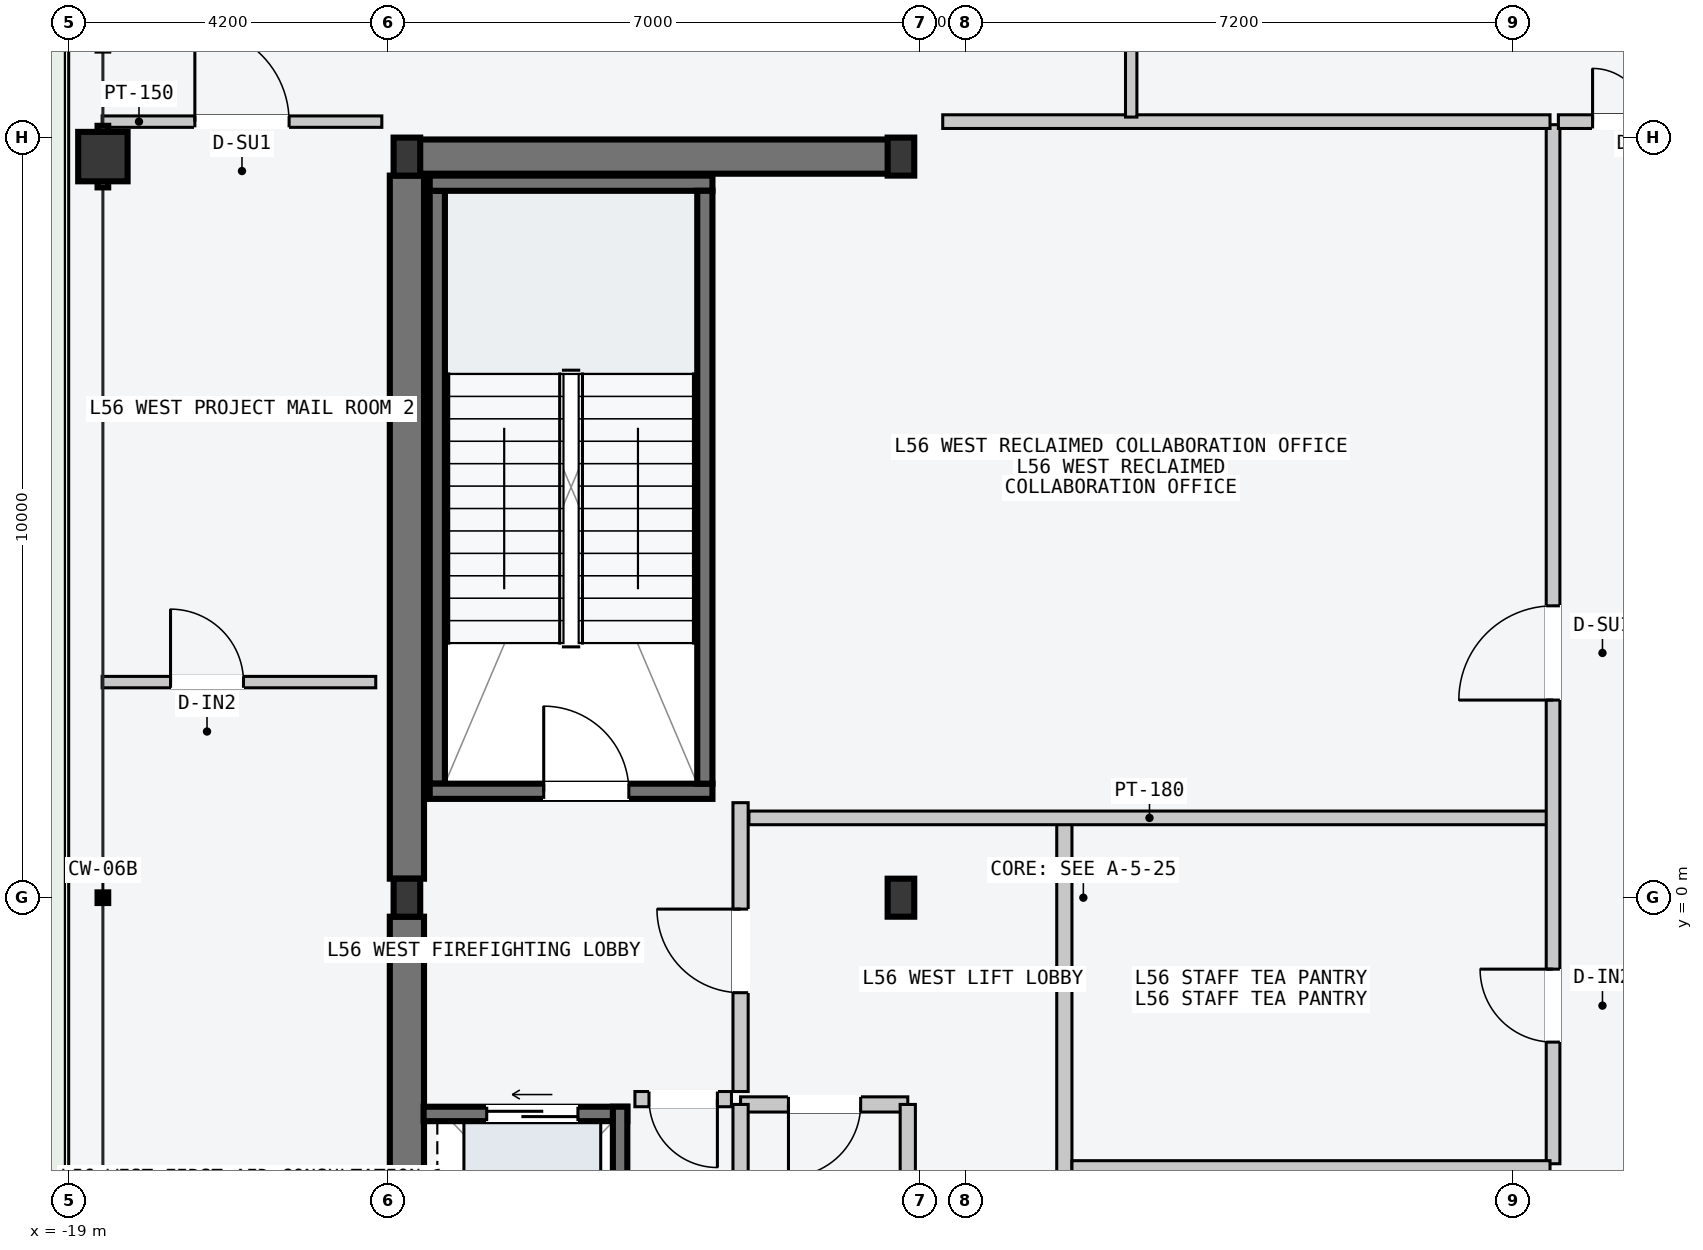
"""IFC4 building model, lengths in metres.
Left out: names, types, materials, properties, quantities, classifications, styles, units other than length and angle.
Written with IfcOpenShell. Run it as: python <this file> out.ifc"""

import sys

from ifc_helpers import new_model, si_unit, direction, frame, frame_2d, origin, origin_2d, place, context, subcontext, project, spatial, rectangle, hollow_rectangle, i_section, extrude, element, fill, save


model = new_model("IFC4")
c1 = context("Model", 3, precision=1e-05, world=origin(), true_north=direction((0.0, 1.0)))
c2 = subcontext(c1, "Body", "Model", "MODEL_VIEW")
j1 = project(units=[si_unit("LENGTHUNIT", "METRE"), si_unit("PLANEANGLEUNIT", "RADIAN")], contexts=[c1])
p1 = place(None, origin())
s1 = spatial("IfcSite", under=j1, at=p1, CompositionType="ELEMENT")
p2 = place(p1, origin())
s2 = spatial("IfcBuilding", under=s1, at=p2, CompositionType="ELEMENT")
p3 = place(p2, frame((0.0, 0.0, 213.9)))
s3 = spatial("IfcBuildingStorey", under=s2, at=p3, CompositionType="ELEMENT", Elevation=213.9)
p4 = place(p3, frame((-14.53, 9.75, -0.2), z_axis=(0.0, 0.0, 1.0), x_axis=(1.0, 0.0, 0.0)))
e1 = element("IfcWall", 1, at=p4, inside=s3, PredefinedType="SHEAR", context=c2, shape_type="SweptSolid", body=[
    extrude(rectangle(XDim=6.46, YDim=0.45, at=frame_2d((3.23, 0.0))), origin(), (0.0, 0.0, 1.0), 4.5),
])
for number, where, z_axis, x_axis in (
    (2, (-14.55, -9.5, -0.2), (0.0, 0.0, 1.0), (0.0, 1.0, 0.0)),
    (3, (-14.55, 0.25, -0.2), (0.0, 0.0, 1.0), (0.0, 1.0, 0.0)),
):
    element("IfcWall", number, at=place(p3, frame(where, z_axis=z_axis, x_axis=x_axis)), inside=s3, PredefinedType="SHEAR", context=c2, shape_type="SweptSolid", body=[
        extrude(rectangle(XDim=9.25, YDim=0.45, at=frame_2d((4.625, 0.0))), origin(), (0.0, 0.0, 1.0), 4.5),
    ])
p5 = place(p3, frame((-14.15, 1.5, -0.2), z_axis=(0.0, 0.0, 1.0), x_axis=(0.0, 1.0, 0.0)))
e4 = element("IfcWall", 4, at=p5, inside=s3, PredefinedType="SOLIDWALL", context=c2, shape_type="SweptSolid", body=[
    extrude(rectangle(XDim=7.8, YDim=0.2, at=frame_2d((3.9, 0.0))), origin(), (0.0, 0.0, 1.0), 4.5),
])
p6 = place(p3, frame((-14.25, 1.4, -0.2), z_axis=(0.0, 0.0, 1.0), x_axis=(1.0, 0.0, 0.0)))
e5 = element("IfcWall", 5, at=p6, inside=s3, PredefinedType="SOLIDWALL", context=c2, shape_type="SweptSolid", body=[
    extrude(rectangle(XDim=3.72, YDim=0.2, at=frame_2d((1.86, 0.0))), origin(), (0.0, 0.0, 1.0), 4.5),
])
p7 = place(p6, frame((1.5, 0.0, 0.2)))
e6 = element("IfcOpeningElement", 6, at=p7, cuts=e5, PredefinedType="OPENING", context=c2, shape_type="SweptSolid", body=[
    extrude(rectangle(XDim=1.12, YDim=2.18, at=frame_2d((0.56, 1.09))), frame((0.0, 0.11, 0.0), z_axis=(0.0, -1.0, 0.0), x_axis=(1.0, 0.0, 0.0)), (0.0, 0.0, 1.0), 0.22),
])
p8 = place(p3, frame((-14.25, 9.4, -0.2), z_axis=(0.0, 0.0, 1.0), x_axis=(1.0, 0.0, 0.0)))
e7 = element("IfcWall", 7, at=p8, inside=s3, PredefinedType="SOLIDWALL", context=c2, shape_type="SweptSolid", body=[
    extrude(rectangle(XDim=3.72, YDim=0.2, at=frame_2d((1.86, 0.0))), origin(), (0.0, 0.0, 1.0), 4.5),
])
p9 = place(p3, frame((-10.63, 1.5, -0.2), z_axis=(0.0, 0.0, 1.0), x_axis=(0.0, 1.0, 0.0)))
e8 = element("IfcWall", 8, at=p9, inside=s3, PredefinedType="SOLIDWALL", context=c2, shape_type="SweptSolid", body=[
    extrude(rectangle(XDim=7.8, YDim=0.2, at=frame_2d((3.9, 0.0))), origin(), (0.0, 0.0, 1.0), 4.5),
])
for number, where, z_axis, x_axis in (
    (9, (-14.55, 0.0, 0.0), (0.0, 0.0, 1.0), (1.0, 0.0, 0.0)),
    (10, (-14.55, 9.75, 0.0), (0.0, 0.0, 1.0), (1.0, 0.0, 0.0)),
    (11, (-8.05, 0.0, 0.0), (0.0, 0.0, 1.0), (1.0, 0.0, 0.0)),
    (12, (-8.05, 9.75, 0.0), (0.0, 0.0, 1.0), (1.0, 0.0, 0.0)),
):
    element("IfcColumn", number, at=place(p3, frame(where, z_axis=z_axis, x_axis=x_axis)), inside=s3, PredefinedType="COLUMN", context=c2, shape_type="SweptSolid", body=[
        extrude(i_section(OverallWidth=0.35, OverallDepth=0.5, WebThickness=0.02, FlangeThickness=0.032, at=origin_2d()), origin(), (0.0, 0.0, 1.0), 4.5),
    ])
p10 = place(p3, frame((-18.55, 9.75, -0.2), z_axis=(0.0, 0.0, 1.0), x_axis=(0.0, 1.0, 0.0)))
e13 = element("IfcColumn", 13, at=p10, inside=s3, PredefinedType="COLUMN", context=c2, shape_type="SweptSolid", body=[
    extrude(hollow_rectangle(XDim=0.65, YDim=0.65, WallThickness=0.028, at=origin_2d()), origin(), (0.0, 0.0, 1.0), 4.7),
])
p11 = place(p3, frame((-14.33, -2.845, -0.2), z_axis=(0.0, 0.0, 1.0), x_axis=(1.0, 0.0, 0.0)))
e14 = element("IfcWall", 14, at=p11, inside=s3, PredefinedType="SOLIDWALL", context=c2, shape_type="SweptSolid", body=[
    extrude(rectangle(XDim=2.68, YDim=0.19, at=frame_2d((1.34, 0.0))), origin(), (0.0, 0.0, 1.0), 4.5),
])
p12 = place(p11, frame((0.83, 0.0, 0.2)))
e15 = element("IfcOpeningElement", 15, at=p12, cuts=e14, PredefinedType="OPENING", context=c2, shape_type="SweptSolid", body=[
    extrude(rectangle(XDim=1.2, YDim=2.2, at=frame_2d((0.6, 1.1))), frame((0.0, 0.105, 0.0), z_axis=(0.0, -1.0, 0.0), x_axis=(1.0, 0.0, 0.0)), (0.0, 0.0, 1.0), 0.21),
])
p13 = place(p3, frame((-11.745, -5.35, -0.2), z_axis=(0.0, 0.0, 1.0), x_axis=(0.0, 1.0, 0.0)))
e16 = element("IfcWall", 16, at=p13, inside=s3, PredefinedType="SOLIDWALL", context=c2, shape_type="SweptSolid", body=[
    extrude(rectangle(XDim=2.6, YDim=0.19, at=frame_2d((1.3, 0.0))), origin(), (0.0, 0.0, 1.0), 4.5),
])
p14 = place(p3, frame((-5.9, -9.45, 0.0), z_axis=(0.0, 0.0, 1.0), x_axis=(0.0, 1.0, 0.0)))
e17 = element("IfcWall", 17, at=p14, inside=s3, PredefinedType="PARTITIONING", context=c2, shape_type="SweptSolid", body=[
    extrude(rectangle(XDim=10.5, YDim=0.2, at=frame_2d((5.25, 0.0))), origin(), (0.0, 0.0, 1.0), 4.3),
])
p15 = place(p14, frame((3.9, 0.0, 0.0)))
e18 = element("IfcOpeningElement", 18, at=p15, cuts=e17, PredefinedType="OPENING", context=c2, shape_type="SweptSolid", body=[
    extrude(rectangle(XDim=1.5, YDim=2.2, at=frame_2d((0.75, 1.1))), frame((0.0, 0.11, 0.0), z_axis=(0.0, -1.0, 0.0), x_axis=(1.0, 0.0, 0.0)), (0.0, 0.0, 1.0), 0.22),
])
p16 = place(p3, frame((-10.16, -2.55, 0.0), z_axis=(0.0, 0.0, 1.0), x_axis=(0.0, 1.0, 0.0)))
e19 = element("IfcWall", 19, at=p16, inside=s3, PredefinedType="PARTITIONING", context=c2, shape_type="SweptSolid", body=[
    extrude(rectangle(XDim=3.8, YDim=0.2, at=frame_2d((1.9, 0.0))), origin(), (0.0, 0.0, 1.0), 4.3),
])
p17 = place(p16, frame((1.3, 0.0, 0.0)))
e20 = element("IfcOpeningElement", 20, at=p17, cuts=e19, PredefinedType="OPENING", context=c2, shape_type="SweptSolid", body=[
    extrude(rectangle(XDim=1.1, YDim=2.15, at=frame_2d((0.55, 1.075))), frame((0.0, 0.11, 0.0), z_axis=(0.0, -1.0, 0.0), x_axis=(1.0, 0.0, 0.0)), (0.0, 0.0, 1.0), 0.22),
])
p18 = place(p3, frame((-10.28, -2.65, 0.0), z_axis=(0.0, 0.0, 1.0), x_axis=(-1.0, 0.0, 0.0)))
e21 = element("IfcWall", 21, at=p18, inside=s3, PredefinedType="PARTITIONING", context=c2, shape_type="SweptSolid", body=[
    extrude(rectangle(XDim=1.27, YDim=0.2, at=frame_2d((0.635, 0.0))), origin(), (0.0, 0.0, 1.0), 4.3),
])
p19 = place(p18, frame((0.185, 0.0, 0.0)))
e22 = element("IfcOpeningElement", 22, at=p19, cuts=e21, PredefinedType="OPENING", context=c2, shape_type="SweptSolid", body=[
    extrude(rectangle(XDim=0.9, YDim=2.15, at=frame_2d((0.45, 1.075))), frame((0.0, 0.11, 0.0), z_axis=(0.0, -1.0, 0.0), x_axis=(1.0, 0.0, 0.0)), (0.0, 0.0, 1.0), 0.22),
])
p20 = place(p3, frame((-7.96, -2.72, 0.0), z_axis=(0.0, 0.0, 1.0), x_axis=(-1.0, 0.0, 0.0)))
e23 = element("IfcWall", 23, at=p20, inside=s3, PredefinedType="PARTITIONING", context=c2, shape_type="SweptSolid", body=[
    extrude(rectangle(XDim=2.2, YDim=0.2, at=frame_2d((1.1, 0.0))), origin(), (0.0, 0.0, 1.0), 4.3),
])
p21 = place(p20, frame((0.62, 0.0, 0.0)))
e24 = element("IfcOpeningElement", 24, at=p21, cuts=e23, PredefinedType="OPENING", context=c2, shape_type="SweptSolid", body=[
    extrude(rectangle(XDim=0.95, YDim=2.1, at=frame_2d((0.475, 1.05))), frame((0.0, 0.11, 0.0), z_axis=(0.0, -1.0, 0.0), x_axis=(1.0, 0.0, 0.0)), (0.0, 0.0, 1.0), 0.22),
])
for number, where, z_axis, x_axis in (
    (25, (-7.96, -5.16, 0.0), (0.0, 0.0, 1.0), (0.0, 1.0, 0.0)),
    (26, (-10.16, -5.16, 0.0), (0.0, 0.0, 1.0), (0.0, 1.0, 0.0)),
):
    element("IfcWall", number, at=place(p3, frame(where, z_axis=z_axis, x_axis=x_axis)), inside=s3, PredefinedType="PARTITIONING", context=c2, shape_type="SweptSolid", body=[
        extrude(rectangle(XDim=2.44, YDim=0.2, at=frame_2d((1.22, 0.0))), origin(), (0.0, 0.0, 1.0), 4.3),
    ])
p22 = place(p3, frame((-10.05, 1.05, 0.0), z_axis=(0.0, 0.0, 1.0), x_axis=(1.0, 0.0, 0.0)))
e27 = element("IfcWall", 27, at=p22, inside=s3, PredefinedType="PARTITIONING", context=c2, shape_type="SweptSolid", body=[
    extrude(rectangle(XDim=10.54, YDim=0.18, at=frame_2d((5.27, 0.0))), origin(), (0.0, 0.0, 1.0), 4.3),
])
p23 = place(p3, frame((0.53, -3.5, 0.0), z_axis=(0.0, 0.0, 1.0), x_axis=(0.0, 1.0, 0.0)))
e28 = element("IfcWall", 28, at=p23, inside=s3, PredefinedType="PARTITIONING", context=c2, shape_type="SweptSolid", body=[
    extrude(rectangle(XDim=13.67, YDim=0.18, at=frame_2d((6.835, 0.0))), origin(), (0.0, 0.0, 1.0), 4.3),
])
p24 = place(p23, frame((6.1, 0.0, 0.0)))
e29 = element("IfcOpeningElement", 29, at=p24, cuts=e28, PredefinedType="OPENING", context=c2, shape_type="SweptSolid", body=[
    extrude(rectangle(XDim=1.24, YDim=2.24, at=frame_2d((0.62, 1.12))), frame((0.0, 0.1, 0.0), z_axis=(0.0, -1.0, 0.0), x_axis=(1.0, 0.0, 0.0)), (0.0, 0.0, 1.0), 0.2),
])
p25 = place(p23, frame((1.6, 0.0, 0.0)))
e30 = element("IfcOpeningElement", 30, at=p25, cuts=e28, PredefinedType="OPENING", context=c2, shape_type="SweptSolid", body=[
    extrude(rectangle(XDim=0.96, YDim=2.18, at=frame_2d((0.48, 1.09))), frame((0.0, 0.1, 0.0), z_axis=(0.0, -1.0, 0.0), x_axis=(1.0, 0.0, 0.0)), (0.0, 0.0, 1.0), 0.2),
])
p26 = place(p3, frame((-7.5, 10.21, 0.0), z_axis=(0.0, 0.0, 1.0), x_axis=(1.0, 0.0, 0.0)))
e31 = element("IfcWall", 31, at=p26, inside=s3, PredefinedType="PARTITIONING", context=c2, shape_type="SweptSolid", body=[
    extrude(rectangle(XDim=7.99, YDim=0.18, at=frame_2d((3.995, 0.0))), origin(), (0.0, 0.0, 1.0), 4.3),
])
p27 = place(p3, frame((-5.8, -3.55, 0.0), z_axis=(0.0, 0.0, 1.0), x_axis=(1.0, 0.0, 0.0)))
e32 = element("IfcWall", 32, at=p27, inside=s3, PredefinedType="PARTITIONING", context=c2, shape_type="SweptSolid", body=[
    extrude(rectangle(XDim=6.29, YDim=0.18, at=frame_2d((3.145, 0.0))), origin(), (0.0, 0.0, 1.0), 4.3),
])
p28 = place(p3, frame((-5.021, 10.27, 0.0), z_axis=(0.0, 0.0, 1.0), x_axis=(0.0, 1.0, 0.0)))
e33 = element("IfcWall", 33, at=p28, inside=s3, PredefinedType="PARTITIONING", context=c2, shape_type="SweptSolid", body=[
    extrude(rectangle(XDim=7.29, YDim=0.15, at=frame_2d((3.645, 0.0))), origin(), (0.0, 0.0, 1.0), 4.3),
])
p29 = place(p28, frame((1.15, 0.0, 0.0)))
e34 = element("IfcOpeningElement", 34, at=p29, cuts=e33, PredefinedType="OPENING", context=c2, shape_type="SweptSolid", body=[
    extrude(rectangle(XDim=0.96, YDim=2.18, at=frame_2d((0.48, 1.09))), frame((0.0, 0.085, 0.0), z_axis=(0.0, -1.0, 0.0), x_axis=(1.0, 0.0, 0.0)), (0.0, 0.0, 1.0), 0.17),
])
p30 = place(p3, frame((0.6, 10.21, 0.0), z_axis=(0.0, 0.0, 1.0), x_axis=(1.0, 0.0, 0.0)))
e35 = element("IfcWall", 35, at=p30, inside=s3, PredefinedType="PARTITIONING", context=c2, shape_type="SweptSolid", body=[
    extrude(rectangle(XDim=2.3, YDim=0.18, at=frame_2d((1.15, 0.0))), origin(), (0.0, 0.0, 1.0), 4.3),
])
p31 = place(p30, frame((0.45, 0.0, 0.0)))
e36 = element("IfcOpeningElement", 36, at=p31, cuts=e35, PredefinedType="OPENING", context=c2, shape_type="SweptSolid", body=[
    extrude(rectangle(XDim=1.4, YDim=2.2, at=frame_2d((0.7, 1.1))), frame((0.0, 0.1, 0.0), z_axis=(0.0, -1.0, 0.0), x_axis=(1.0, 0.0, 0.0)), (0.0, 0.0, 1.0), 0.2),
])
p32 = place(p3, frame((-18.56, 10.21, 0.0), z_axis=(0.0, 0.0, 1.0), x_axis=(1.0, 0.0, 0.0)))
e37 = element("IfcWall", 37, at=p32, inside=s3, PredefinedType="PARTITIONING", context=c2, shape_type="SweptSolid", body=[
    extrude(rectangle(XDim=3.68, YDim=0.15, at=frame_2d((1.84, 0.0))), origin(), (0.0, 0.0, 1.0), 4.3),
])
p33 = place(p32, frame((1.22, 0.0, 0.0)))
e38 = element("IfcOpeningElement", 38, at=p33, cuts=e37, PredefinedType="OPENING", context=c2, shape_type="SweptSolid", body=[
    extrude(rectangle(XDim=1.24, YDim=2.24, at=frame_2d((0.62, 1.12))), frame((0.0, 0.085, 0.0), z_axis=(0.0, -1.0, 0.0), x_axis=(1.0, 0.0, 0.0)), (0.0, 0.0, 1.0), 0.17),
])
p34 = place(p3, frame((-18.56, 2.836, 0.0), z_axis=(0.0, 0.0, 1.0), x_axis=(1.0, 0.0, 0.0)))
e39 = element("IfcWall", 39, at=p34, inside=s3, PredefinedType="PARTITIONING", context=c2, shape_type="SweptSolid", body=[
    extrude(rectangle(XDim=3.6, YDim=0.15, at=frame_2d((1.8, 0.0))), origin(), (0.0, 0.0, 1.0), 4.3),
])
p35 = place(p34, frame((0.9, 0.0, 0.0)))
e40 = element("IfcOpeningElement", 40, at=p35, cuts=e39, PredefinedType="OPENING", context=c2, shape_type="SweptSolid", body=[
    extrude(rectangle(XDim=0.96, YDim=2.18, at=frame_2d((0.48, 1.09))), frame((0.0, 0.085, 0.0), z_axis=(0.0, -1.0, 0.0), x_axis=(1.0, 0.0, 0.0)), (0.0, 0.0, 1.0), 0.17),
])
p36 = place(p7, origin())
e41 = element("IfcDoor", 41, at=p36, inside=s3, OperationType="SINGLE_SWING_LEFT", PredefinedType="DOOR", context=c2, shape_type="SweptSolid", body=[
    extrude(rectangle(XDim=1.12, YDim=2.18, at=frame_2d((0.56, 1.09))), frame((0.0, 0.025, 0.0), z_axis=(0.0, -1.0, 0.0), x_axis=(1.0, 0.0, 0.0)), (0.0, 0.0, 1.0), 0.05),
])
fill(e6, e41)
p37 = place(p12, origin())
e42 = element("IfcDoor", 42, at=p37, inside=s3, OperationType="SLIDING_TO_LEFT", PredefinedType="DOOR", context=c2, shape_type="SweptSolid", body=[
    extrude(rectangle(XDim=1.2, YDim=2.2, at=frame_2d((0.6, 1.1))), frame((0.0, 0.025, 0.0), z_axis=(0.0, -1.0, 0.0), x_axis=(1.0, 0.0, 0.0)), (0.0, 0.0, 1.0), 0.05),
])
fill(e15, e42)
p38 = place(p17, origin())
e43 = element("IfcDoor", 43, at=p38, inside=s3, OperationType="SINGLE_SWING_RIGHT", PredefinedType="DOOR", context=c2, shape_type="SweptSolid", body=[
    extrude(rectangle(XDim=1.1, YDim=2.15, at=frame_2d((0.55, 1.075))), frame((0.0, 0.025, 0.0), z_axis=(0.0, -1.0, 0.0), x_axis=(1.0, 0.0, 0.0)), (0.0, 0.0, 1.0), 0.05),
])
fill(e20, e43)
p39 = place(p19, origin())
e44 = element("IfcDoor", 44, at=p39, inside=s3, OperationType="SINGLE_SWING_LEFT", PredefinedType="DOOR", context=c2, shape_type="SweptSolid", body=[
    extrude(rectangle(XDim=0.9, YDim=2.15, at=frame_2d((0.45, 1.075))), frame((0.0, 0.025, 0.0), z_axis=(0.0, -1.0, 0.0), x_axis=(1.0, 0.0, 0.0)), (0.0, 0.0, 1.0), 0.05),
])
fill(e22, e44)
p40 = place(p21, origin())
e45 = element("IfcDoor", 45, at=p40, inside=s3, OperationType="SINGLE_SWING_RIGHT", PredefinedType="DOOR", context=c2, shape_type="SweptSolid", body=[
    extrude(rectangle(XDim=0.95, YDim=2.1, at=frame_2d((0.475, 1.05))), frame((0.0, 0.025, 0.0), z_axis=(0.0, -1.0, 0.0), x_axis=(1.0, 0.0, 0.0)), (0.0, 0.0, 1.0), 0.05),
])
fill(e24, e45)
p41 = place(p24, origin())
e46 = element("IfcDoor", 46, at=p41, inside=s3, OperationType="SINGLE_SWING_LEFT", PredefinedType="DOOR", context=c2, shape_type="SweptSolid", body=[
    extrude(rectangle(XDim=1.24, YDim=2.24, at=frame_2d((0.62, 1.12))), frame((0.0, 0.025, 0.0), z_axis=(0.0, -1.0, 0.0), x_axis=(1.0, 0.0, 0.0)), (0.0, 0.0, 1.0), 0.05),
])
fill(e29, e46)
p42 = place(p25, origin())
e47 = element("IfcDoor", 47, at=p42, inside=s3, OperationType="SINGLE_SWING_RIGHT", PredefinedType="DOOR", context=c2, shape_type="SweptSolid", body=[
    extrude(rectangle(XDim=0.96, YDim=2.18, at=frame_2d((0.48, 1.09))), frame((0.0, 0.025, 0.0), z_axis=(0.0, -1.0, 0.0), x_axis=(1.0, 0.0, 0.0)), (0.0, 0.0, 1.0), 0.05),
])
fill(e30, e47)
p43 = place(p31, origin())
e48 = element("IfcDoor", 48, at=p43, inside=s3, OperationType="DOUBLE_DOOR_SINGLE_SWING", PredefinedType="DOOR", context=c2, shape_type="SweptSolid", body=[
    extrude(rectangle(XDim=1.4, YDim=2.2, at=frame_2d((0.7, 1.1))), frame((0.0, 0.025, 0.0), z_axis=(0.0, -1.0, 0.0), x_axis=(1.0, 0.0, 0.0)), (0.0, 0.0, 1.0), 0.05),
])
fill(e36, e48)
p44 = place(p33, origin())
e49 = element("IfcDoor", 49, at=p44, inside=s3, OperationType="SINGLE_SWING_LEFT", PredefinedType="DOOR", context=c2, shape_type="SweptSolid", body=[
    extrude(rectangle(XDim=1.24, YDim=2.24, at=frame_2d((0.62, 1.12))), frame((0.0, 0.025, 0.0), z_axis=(0.0, -1.0, 0.0), x_axis=(1.0, 0.0, 0.0)), (0.0, 0.0, 1.0), 0.05),
])
fill(e38, e49)
p45 = place(p35, origin())
e50 = element("IfcDoor", 50, at=p45, inside=s3, OperationType="SINGLE_SWING_LEFT", PredefinedType="DOOR", context=c2, shape_type="SweptSolid", body=[
    extrude(rectangle(XDim=0.96, YDim=2.18, at=frame_2d((0.48, 1.09))), frame((0.0, 0.025, 0.0), z_axis=(0.0, -1.0, 0.0), x_axis=(1.0, 0.0, 0.0)), (0.0, 0.0, 1.0), 0.05),
])
fill(e40, e50)
save(model, sys.argv[1])
